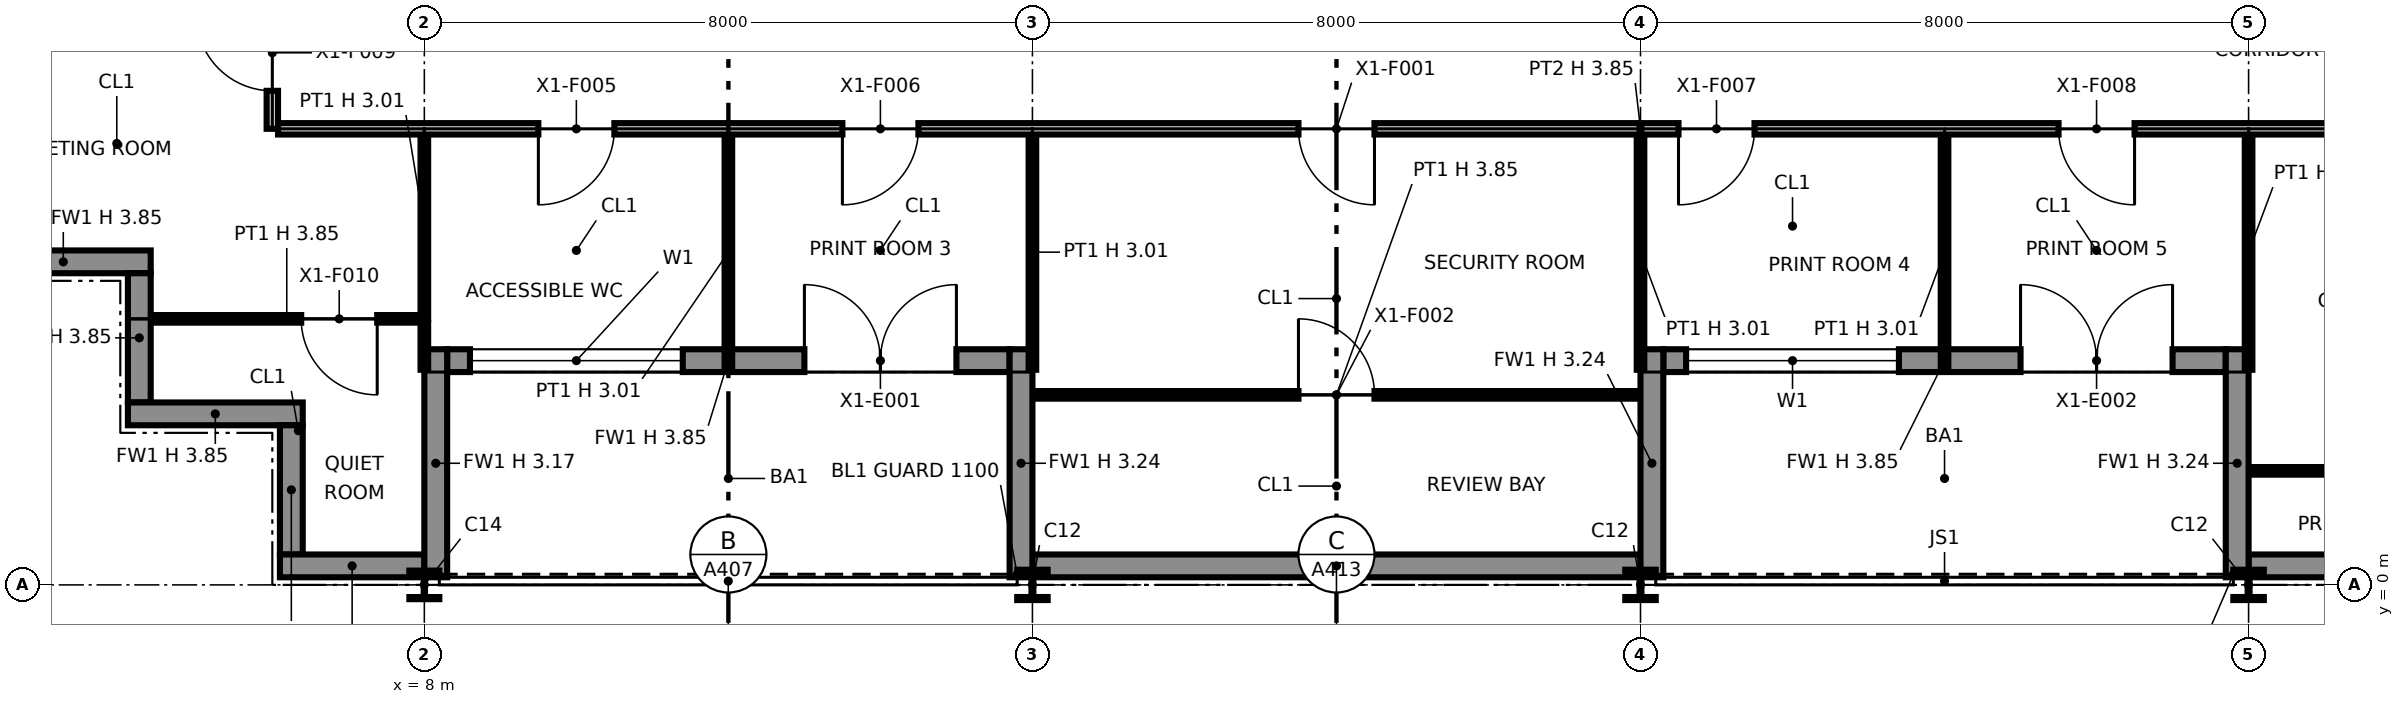
"""IFC4 building model, lengths in metres.
Left out: names, types, materials, properties, quantities, classifications, styles, units other than length and angle.
Written with IfcOpenShell. Run it as: python <this file> out.ifc"""

import sys

from ifc_helpers import new_model, si_unit, direction, frame, frame_2d, origin, origin_2d, place, context, subcontext, project, spatial, polyline, rectangle, i_section, outline, extrude, element, fill, save


model = new_model("IFC4")
c1 = context("Model", 3, precision=1e-05, world=origin(), true_north=direction((0.0, 1.0)))
c2 = subcontext(c1, "Body", "Model", "MODEL_VIEW")
j1 = project(units=[si_unit("LENGTHUNIT", "METRE"), si_unit("PLANEANGLEUNIT", "RADIAN")], contexts=[c1])
p1 = place(None, origin())
s1 = spatial("IfcSite", under=j1, at=p1, CompositionType="ELEMENT")
p2 = place(p1, origin())
s2 = spatial("IfcBuilding", under=s1, at=p2, CompositionType="ELEMENT")
p3 = place(p2, frame((0.0, 0.0, 247.0)))
s3 = spatial("IfcBuildingStorey", under=s2, at=p3, CompositionType="ELEMENT", Elevation=247.0)
p4 = place(p3, frame((8.0, 0.0, 0.0), z_axis=(0.0, 0.0, 1.0), x_axis=(1.0, 0.0, 0.0)))
e1 = element("IfcColumn", 1, at=p4, inside=s3, PredefinedType="COLUMN", context=c2, shape_type="SweptSolid", body=[
    extrude(i_section(OverallWidth=0.394, OverallDepth=0.376, WebThickness=0.017, FlangeThickness=0.028, at=origin_2d()), origin(), (0.0, 0.0, 1.0), 3.85),
])
for number, where, z_axis, x_axis in (
    (2, (16.0, 0.0, 0.0), (0.0, 0.0, 1.0), (1.0, 0.0, 0.0)),
    (3, (24.0, 0.0, 0.0), (0.0, 0.0, 1.0), (1.0, 0.0, 0.0)),
    (4, (32.0, 0.0, 0.0), (0.0, 0.0, 1.0), (1.0, 0.0, 0.0)),
):
    element("IfcColumn", number, at=place(p3, frame(where, z_axis=z_axis, x_axis=x_axis)), inside=s3, PredefinedType="COLUMN", context=c2, shape_type="SweptSolid", body=[
        extrude(i_section(OverallWidth=0.401, OverallDepth=0.399, WebThickness=0.025, FlangeThickness=0.04, at=origin_2d()), origin(), (0.0, 0.0, 1.0), 3.85),
    ])
p5 = place(p3, frame((2.1, 4.25, 0.0), z_axis=(0.0, 0.0, 1.0), x_axis=(1.0, 0.0, 0.0)))
e5 = element("IfcWall", 5, at=p5, inside=s3, PredefinedType="SOLIDWALL", context=c2, shape_type="SweptSolid", body=[
    extrude(rectangle(XDim=2.3, YDim=0.3, at=frame_2d((1.15, 0.0))), origin(), (0.0, 0.0, 1.0), 3.85),
])
p6 = place(p3, frame((4.25, 4.1, 0.0), z_axis=(0.0, 0.0, 1.0), x_axis=(0.0, -1.0, 0.0)))
e6 = element("IfcWall", 6, at=p6, inside=s3, PredefinedType="SOLIDWALL", context=c2, shape_type="SweptSolid", body=[
    extrude(rectangle(XDim=1.7, YDim=0.3, at=frame_2d((0.85, 0.0))), origin(), (0.0, 0.0, 1.0), 3.85),
])
p7 = place(p3, frame((4.1, 2.25, 0.0), z_axis=(0.0, 0.0, 1.0), x_axis=(1.0, 0.0, 0.0)))
e7 = element("IfcWall", 7, at=p7, inside=s3, PredefinedType="SOLIDWALL", context=c2, shape_type="SweptSolid", body=[
    extrude(rectangle(XDim=2.3, YDim=0.3, at=frame_2d((1.15, 0.0))), origin(), (0.0, 0.0, 1.0), 3.85),
])
p8 = place(p3, frame((6.25, 2.1, 0.0), z_axis=(0.0, 0.0, 1.0), x_axis=(0.0, -1.0, 0.0)))
e8 = element("IfcWall", 8, at=p8, inside=s3, PredefinedType="SOLIDWALL", context=c2, shape_type="SweptSolid", body=[
    extrude(rectangle(XDim=1.7, YDim=0.3, at=frame_2d((0.85, 0.0))), origin(), (0.0, 0.0, 1.0), 3.85),
])
p9 = place(p3, frame((6.1, 0.25, 0.0), z_axis=(0.0, 0.0, 1.0), x_axis=(1.0, 0.0, 0.0)))
e9 = element("IfcWall", 9, at=p9, inside=s3, PredefinedType="SOLIDWALL", context=c2, shape_type="SweptSolid", body=[
    extrude(rectangle(XDim=1.9, YDim=0.3, at=frame_2d((0.95, 0.0))), origin(), (0.0, 0.0, 1.0), 3.85),
])
p10 = place(p3, frame((8.3, 2.95, 0.0), z_axis=(0.0, 0.0, 1.0), x_axis=(1.0, 0.0, 0.0)))
e10 = element("IfcWall", 10, at=p10, inside=s3, PredefinedType="SOLIDWALL", context=c2, shape_type="SweptSolid", body=[
    extrude(rectangle(XDim=7.4, YDim=0.3, at=frame_2d((3.7, 0.0))), origin(), (0.0, 0.0, 1.0), 3.85),
])
p11 = place(p10, frame((0.3, 0.0, 0.9)))
e11 = element("IfcOpeningElement", 11, at=p11, cuts=e10, PredefinedType="OPENING", context=c2, shape_type="SweptSolid", body=[
    extrude(rectangle(XDim=2.8, YDim=2.2, at=frame_2d((1.4, 1.1))), frame((0.0, 0.16, 0.0), z_axis=(0.0, -1.0, 0.0), x_axis=(1.0, 0.0, 0.0)), (0.0, 0.0, 1.0), 0.32),
])
p12 = place(p10, frame((4.7, 0.0, 0.0)))
e12 = element("IfcOpeningElement", 12, at=p12, cuts=e10, PredefinedType="OPENING", context=c2, shape_type="SweptSolid", body=[
    extrude(rectangle(XDim=2.0, YDim=2.4, at=frame_2d((1.0, 1.2))), frame((0.0, 0.16, 0.0), z_axis=(0.0, -1.0, 0.0), x_axis=(1.0, 0.0, 0.0)), (0.0, 0.0, 1.0), 0.32),
])
p13 = place(p3, frame((8.15, 0.1, 0.0), z_axis=(0.0, 0.0, 1.0), x_axis=(0.0, 1.0, 0.0)))
e13 = element("IfcWall", 13, at=p13, inside=s3, PredefinedType="SOLIDWALL", context=c2, shape_type="SweptSolid", body=[
    extrude(rectangle(XDim=3.0, YDim=0.3, at=frame_2d((1.5, 0.0))), origin(), (0.0, 0.0, 1.0), 3.171),
])
p14 = place(p3, frame((15.85, 0.1, 0.0), z_axis=(0.0, 0.0, 1.0), x_axis=(0.0, 1.0, 0.0)))
e14 = element("IfcWall", 14, at=p14, inside=s3, PredefinedType="SOLIDWALL", context=c2, shape_type="SweptSolid", body=[
    extrude(rectangle(XDim=3.0, YDim=0.3, at=frame_2d((1.5, 0.0))), origin(), (0.0, 0.0, 1.0), 3.237),
])
p15 = place(p3, frame((16.0, 0.25, 0.0), z_axis=(0.0, 0.0, 1.0), x_axis=(1.0, 0.0, 0.0)))
e15 = element("IfcWall", 15, at=p15, inside=s3, PredefinedType="SOLIDWALL", context=c2, shape_type="SweptSolid", body=[
    extrude(rectangle(XDim=8.0, YDim=0.3, at=frame_2d((4.0, 0.0))), origin(), (0.0, 0.0, 1.0), 3.85),
])
p16 = place(p3, frame((24.3, 2.95, 0.0), z_axis=(0.0, 0.0, 1.0), x_axis=(1.0, 0.0, 0.0)))
e16 = element("IfcWall", 16, at=p16, inside=s3, PredefinedType="SOLIDWALL", context=c2, shape_type="SweptSolid", body=[
    extrude(rectangle(XDim=7.4, YDim=0.3, at=frame_2d((3.7, 0.0))), origin(), (0.0, 0.0, 1.0), 3.85),
])
p17 = place(p16, frame((0.3, 0.0, 0.9)))
e17 = element("IfcOpeningElement", 17, at=p17, cuts=e16, PredefinedType="OPENING", context=c2, shape_type="SweptSolid", body=[
    extrude(rectangle(XDim=2.8, YDim=2.2, at=frame_2d((1.4, 1.1))), frame((0.0, 0.16, 0.0), z_axis=(0.0, -1.0, 0.0), x_axis=(1.0, 0.0, 0.0)), (0.0, 0.0, 1.0), 0.32),
])
p18 = place(p16, frame((4.7, 0.0, 0.0)))
e18 = element("IfcOpeningElement", 18, at=p18, cuts=e16, PredefinedType="OPENING", context=c2, shape_type="SweptSolid", body=[
    extrude(rectangle(XDim=2.0, YDim=2.4, at=frame_2d((1.0, 1.2))), frame((0.0, 0.16, 0.0), z_axis=(0.0, -1.0, 0.0), x_axis=(1.0, 0.0, 0.0)), (0.0, 0.0, 1.0), 0.32),
])
for number, where, z_axis, x_axis in (
    (19, (24.15, 0.1, 0.0), (0.0, 0.0, 1.0), (0.0, 1.0, 0.0)),
    (20, (31.85, 0.1, 0.0), (0.0, 0.0, 1.0), (0.0, 1.0, 0.0)),
):
    element("IfcWall", number, at=place(p3, frame(where, z_axis=z_axis, x_axis=x_axis)), inside=s3, PredefinedType="SOLIDWALL", context=c2, shape_type="SweptSolid", body=[
        extrude(rectangle(XDim=3.0, YDim=0.3, at=frame_2d((1.5, 0.0))), origin(), (0.0, 0.0, 1.0), 3.237),
    ])
p19 = place(p3, frame((32.0, 0.25, 0.0), z_axis=(0.0, 0.0, 1.0), x_axis=(1.0, 0.0, 0.0)))
e21 = element("IfcWall", 21, at=p19, inside=s3, PredefinedType="SOLIDWALL", context=c2, shape_type="SweptSolid", body=[
    extrude(rectangle(XDim=9.9, YDim=0.3, at=frame_2d((4.95, 0.0))), origin(), (0.0, 0.0, 1.0), 3.85),
])
p20 = place(p3, frame((32.03, 1.5, 0.0), z_axis=(0.0, 0.0, 1.0), x_axis=(1.0, 0.0, 0.0)))
e22 = element("IfcWall", 22, at=p20, inside=s3, PredefinedType="PARTITIONING", context=c2, shape_type="SweptSolid", body=[
    extrude(rectangle(XDim=7.92, YDim=0.1, at=frame_2d((3.96, 0.0))), origin(), (0.0, 0.0, 1.0), 3.85),
])
p21 = place(p20, frame((3.47, 0.0, 0.0)))
e23 = element("IfcOpeningElement", 23, at=p21, cuts=e22, PredefinedType="OPENING", context=c2, shape_type="SweptSolid", body=[
    extrude(rectangle(XDim=1.0, YDim=2.1, at=frame_2d((0.5, 1.05))), frame((0.0, 0.06, 0.0), z_axis=(0.0, -1.0, 0.0), x_axis=(1.0, 0.0, 0.0)), (0.0, 0.0, 1.0), 0.12),
])
p22 = place(p3, frame((16.03, 2.5, 0.0), z_axis=(0.0, 0.0, 1.0), x_axis=(1.0, 0.0, 0.0)))
e24 = element("IfcWall", 24, at=p22, inside=s3, PredefinedType="PARTITIONING", context=c2, shape_type="SweptSolid", body=[
    extrude(rectangle(XDim=7.94, YDim=0.1, at=frame_2d((3.97, 0.0))), origin(), (0.0, 0.0, 1.0), 3.85),
])
p23 = place(p22, frame((3.47, 0.0, 0.0)))
e25 = element("IfcOpeningElement", 25, at=p23, cuts=e24, PredefinedType="OPENING", context=c2, shape_type="SweptSolid", body=[
    extrude(rectangle(XDim=1.0, YDim=2.1, at=frame_2d((0.5, 1.05))), frame((0.0, 0.06, 0.0), z_axis=(0.0, -1.0, 0.0), x_axis=(1.0, 0.0, 0.0)), (0.0, 0.0, 1.0), 0.12),
])
p24 = place(p3, frame((8.0, 2.83, 0.0), z_axis=(0.0, 0.0, 1.0), x_axis=(0.0, 1.0, 0.0)))
e26 = element("IfcWall", 26, at=p24, inside=s3, PredefinedType="PARTITIONING", context=c2, shape_type="SweptSolid", body=[
    extrude(rectangle(XDim=0.62, YDim=0.1, at=frame_2d((0.31, 0.0))), origin(), (0.0, 0.0, 1.0), 3.014),
])
for number, where, z_axis, x_axis in (
    (27, (12.0, 2.83, 0.0), (0.0, 0.0, 1.0), (0.0, 1.0, 0.0)),
    (28, (16.0, 2.83, 0.0), (0.0, 0.0, 1.0), (0.0, 1.0, 0.0)),
    (29, (24.0, 2.83, 0.0), (0.0, 0.0, 1.0), (0.0, 1.0, 0.0)),
    (30, (28.0, 2.83, 0.0), (0.0, 0.0, 1.0), (0.0, 1.0, 0.0)),
    (31, (32.0, 2.83, 0.0), (0.0, 0.0, 1.0), (0.0, 1.0, 0.0)),
):
    element("IfcWall", number, at=place(p3, frame(where, z_axis=z_axis, x_axis=x_axis)), inside=s3, PredefinedType="PARTITIONING", context=c2, shape_type="SweptSolid", body=[
        extrude(rectangle(XDim=3.095, YDim=0.1, at=frame_2d((1.547, 0.0))), origin(), (0.0, 0.0, 1.0), 3.014),
    ])
p25 = place(p3, frame((4.43, 3.5, 0.0), z_axis=(0.0, 0.0, 1.0), x_axis=(1.0, 0.0, 0.0)))
e32 = element("IfcWall", 32, at=p25, inside=s3, PredefinedType="PARTITIONING", context=c2, shape_type="SweptSolid", body=[
    extrude(rectangle(XDim=3.52, YDim=0.1, at=frame_2d((1.76, 0.0))), origin(), (0.0, 0.0, 1.0), 3.85),
])
p26 = place(p25, frame((2.95, 0.0, 0.0), z_axis=(0.0, 0.0, 1.0), x_axis=(-1.0, 0.0, 0.0)))
e33 = element("IfcOpeningElement", 33, at=p26, cuts=e32, PredefinedType="OPENING", context=c2, shape_type="SweptSolid", body=[
    extrude(rectangle(XDim=1.0, YDim=2.1, at=frame_2d((0.5, 1.05))), frame((0.0, 0.06, 0.0), z_axis=(0.0, -1.0, 0.0), x_axis=(1.0, 0.0, 0.0)), (0.0, 0.0, 1.0), 0.12),
])
p27 = place(p3, frame((8.0, 3.5, 0.0), z_axis=(0.0, 0.0, 1.0), x_axis=(0.0, 1.0, 0.0)))
e34 = element("IfcWall", 34, at=p27, inside=s3, PredefinedType="PARTITIONING", context=c2, shape_type="SweptSolid", body=[
    extrude(rectangle(XDim=2.425, YDim=0.1, at=frame_2d((1.212, 0.0))), origin(), (0.0, 0.0, 1.0), 3.014),
])
p28 = place(p3, frame((6.075, 6.0, 0.0), z_axis=(0.0, 0.0, 1.0), x_axis=(1.0, 0.0, 0.0)))
e35 = element("IfcWall", 35, at=p28, inside=s3, PredefinedType="PARTITIONING", context=c2, shape_type="SweptSolid", body=[
    extrude(rectangle(XDim=35.85, YDim=0.15, at=frame_2d((17.925, 0.0))), origin(), (0.0, 0.0, 1.0), 3.85),
])
p29 = place(p28, frame((14.425, 0.0, 0.0), z_axis=(0.0, 0.0, 1.0), x_axis=(-1.0, 0.0, 0.0)))
e36 = element("IfcOpeningElement", 36, at=p29, cuts=e35, PredefinedType="OPENING", context=c2, shape_type="SweptSolid", body=[
    extrude(rectangle(XDim=1.0, YDim=2.1, at=frame_2d((0.5, 1.05))), frame((0.0, 0.085, 0.0), z_axis=(0.0, -1.0, 0.0), x_axis=(1.0, 0.0, 0.0)), (0.0, 0.0, 1.0), 0.17),
])
p30 = place(p28, frame((30.425, 0.0, 0.0), z_axis=(0.0, 0.0, 1.0), x_axis=(-1.0, 0.0, 0.0)))
e37 = element("IfcOpeningElement", 37, at=p30, cuts=e35, PredefinedType="OPENING", context=c2, shape_type="SweptSolid", body=[
    extrude(rectangle(XDim=1.0, YDim=2.1, at=frame_2d((0.5, 1.05))), frame((0.0, 0.085, 0.0), z_axis=(0.0, -1.0, 0.0), x_axis=(1.0, 0.0, 0.0)), (0.0, 0.0, 1.0), 0.17),
])
p31 = place(p28, frame((4.425, 0.0, 0.0), z_axis=(0.0, 0.0, 1.0), x_axis=(-1.0, 0.0, 0.0)))
e38 = element("IfcOpeningElement", 38, at=p31, cuts=e35, PredefinedType="OPENING", context=c2, shape_type="SweptSolid", body=[
    extrude(rectangle(XDim=1.0, YDim=2.1, at=frame_2d((0.5, 1.05))), frame((0.0, 0.085, 0.0), z_axis=(0.0, -1.0, 0.0), x_axis=(1.0, 0.0, 0.0)), (0.0, 0.0, 1.0), 0.17),
])
p32 = place(p28, frame((8.425, 0.0, 0.0), z_axis=(0.0, 0.0, 1.0), x_axis=(-1.0, 0.0, 0.0)))
e39 = element("IfcOpeningElement", 39, at=p32, cuts=e35, PredefinedType="OPENING", context=c2, shape_type="SweptSolid", body=[
    extrude(rectangle(XDim=1.0, YDim=2.1, at=frame_2d((0.5, 1.05))), frame((0.0, 0.085, 0.0), z_axis=(0.0, -1.0, 0.0), x_axis=(1.0, 0.0, 0.0)), (0.0, 0.0, 1.0), 0.17),
])
p33 = place(p28, frame((19.425, 0.0, 0.0), z_axis=(0.0, 0.0, 1.0), x_axis=(-1.0, 0.0, 0.0)))
e40 = element("IfcOpeningElement", 40, at=p33, cuts=e35, PredefinedType="OPENING", context=c2, shape_type="SweptSolid", body=[
    extrude(rectangle(XDim=1.0, YDim=2.1, at=frame_2d((0.5, 1.05))), frame((0.0, 0.085, 0.0), z_axis=(0.0, -1.0, 0.0), x_axis=(1.0, 0.0, 0.0)), (0.0, 0.0, 1.0), 0.17),
])
p34 = place(p28, frame((24.425, 0.0, 0.0), z_axis=(0.0, 0.0, 1.0), x_axis=(-1.0, 0.0, 0.0)))
e41 = element("IfcOpeningElement", 41, at=p34, cuts=e35, PredefinedType="OPENING", context=c2, shape_type="SweptSolid", body=[
    extrude(rectangle(XDim=1.0, YDim=2.1, at=frame_2d((0.5, 1.05))), frame((0.0, 0.085, 0.0), z_axis=(0.0, -1.0, 0.0), x_axis=(1.0, 0.0, 0.0)), (0.0, 0.0, 1.0), 0.17),
])
p35 = place(p28, frame((35.425, 0.0, 0.0), z_axis=(0.0, 0.0, 1.0), x_axis=(-1.0, 0.0, 0.0)))
e42 = element("IfcOpeningElement", 42, at=p35, cuts=e35, PredefinedType="OPENING", context=c2, shape_type="SweptSolid", body=[
    extrude(rectangle(XDim=1.0, YDim=2.1, at=frame_2d((0.5, 1.05))), frame((0.0, 0.085, 0.0), z_axis=(0.0, -1.0, 0.0), x_axis=(1.0, 0.0, 0.0)), (0.0, 0.0, 1.0), 0.17),
])
p36 = place(p3, frame((6.0, 6.0, 0.0), z_axis=(0.0, 0.0, 1.0), x_axis=(0.0, 1.0, 0.0)))
e43 = element("IfcWall", 43, at=p36, inside=s3, PredefinedType="PARTITIONING", context=c2, shape_type="SweptSolid", body=[
    extrude(outline(polyline([(0.0, 0.0), (13.375, 0.0), (13.375, 3.85), (10.3, 3.85), (10.298, 3.014), (9.702, 3.014), (9.7, 3.85), (6.3, 3.85), (6.298, 3.014), (5.702, 3.014), (5.7, 3.85), (2.3, 3.85), (2.298, 3.014), (1.702, 3.014), (1.7, 3.85), (0.0, 3.85), (0.0, 0.0)])), frame((0.0, 0.075, 0.0), z_axis=(0.0, -1.0, 0.0), x_axis=(1.0, 0.0, 0.0)), (0.0, 0.0, 1.0), 0.15),
])
p37 = place(p36, frame((0.5, 0.0, 0.0)))
e44 = element("IfcOpeningElement", 44, at=p37, cuts=e43, PredefinedType="OPENING", context=c2, shape_type="SweptSolid", body=[
    extrude(rectangle(XDim=1.0, YDim=2.1, at=frame_2d((0.5, 1.05))), frame((0.0, 0.085, 0.0), z_axis=(0.0, -1.0, 0.0), x_axis=(1.0, 0.0, 0.0)), (0.0, 0.0, 1.0), 0.17),
])
p38 = place(p36, frame((3.5, 0.0, 0.0)))
e45 = element("IfcOpeningElement", 45, at=p38, cuts=e43, PredefinedType="OPENING", context=c2, shape_type="SweptSolid", body=[
    extrude(rectangle(XDim=1.0, YDim=2.1, at=frame_2d((0.5, 1.05))), frame((0.0, 0.085, 0.0), z_axis=(0.0, -1.0, 0.0), x_axis=(1.0, 0.0, 0.0)), (0.0, 0.0, 1.0), 0.17),
])
p39 = place(p36, frame((7.5, 0.0, 0.0)))
e46 = element("IfcOpeningElement", 46, at=p39, cuts=e43, PredefinedType="OPENING", context=c2, shape_type="SweptSolid", body=[
    extrude(rectangle(XDim=1.0, YDim=2.1, at=frame_2d((0.5, 1.05))), frame((0.0, 0.085, 0.0), z_axis=(0.0, -1.0, 0.0), x_axis=(1.0, 0.0, 0.0)), (0.0, 0.0, 1.0), 0.17),
])
p40 = place(p36, frame((11.225, 0.0, 0.0)))
e47 = element("IfcOpeningElement", 47, at=p40, cuts=e43, PredefinedType="OPENING", context=c2, shape_type="SweptSolid", body=[
    extrude(rectangle(XDim=1.0, YDim=2.1, at=frame_2d((0.5, 1.05))), frame((0.0, 0.085, 0.0), z_axis=(0.0, -1.0, 0.0), x_axis=(1.0, 0.0, 0.0)), (0.0, 0.0, 1.0), 0.17),
])
p41 = place(p11, origin())
e48 = element("IfcWindow", 48, at=p41, inside=s3, PartitioningType="SINGLE_PANEL", PredefinedType="WINDOW", context=c2, shape_type="SweptSolid", body=[
    extrude(rectangle(XDim=2.8, YDim=2.2, at=frame_2d((1.4, 1.1))), frame((0.0, 0.03, 0.0), z_axis=(0.0, -1.0, 0.0), x_axis=(1.0, 0.0, 0.0)), (0.0, 0.0, 1.0), 0.06),
])
fill(e11, e48)
p42 = place(p12, origin())
e49 = element("IfcDoor", 49, at=p42, inside=s3, OperationType="DOUBLE_DOOR_SINGLE_SWING", PredefinedType="DOOR", context=c2, shape_type="SweptSolid", body=[
    extrude(rectangle(XDim=2.0, YDim=2.4, at=frame_2d((1.0, 1.2))), frame((0.0, 0.025, 0.0), z_axis=(0.0, -1.0, 0.0), x_axis=(1.0, 0.0, 0.0)), (0.0, 0.0, 1.0), 0.05),
])
fill(e12, e49)
p43 = place(p17, origin())
e50 = element("IfcWindow", 50, at=p43, inside=s3, PartitioningType="SINGLE_PANEL", PredefinedType="WINDOW", context=c2, shape_type="SweptSolid", body=[
    extrude(rectangle(XDim=2.8, YDim=2.2, at=frame_2d((1.4, 1.1))), frame((0.0, 0.03, 0.0), z_axis=(0.0, -1.0, 0.0), x_axis=(1.0, 0.0, 0.0)), (0.0, 0.0, 1.0), 0.06),
])
fill(e17, e50)
p44 = place(p18, origin())
e51 = element("IfcDoor", 51, at=p44, inside=s3, OperationType="DOUBLE_DOOR_SINGLE_SWING", PredefinedType="DOOR", context=c2, shape_type="SweptSolid", body=[
    extrude(rectangle(XDim=2.0, YDim=2.4, at=frame_2d((1.0, 1.2))), frame((0.0, 0.025, 0.0), z_axis=(0.0, -1.0, 0.0), x_axis=(1.0, 0.0, 0.0)), (0.0, 0.0, 1.0), 0.05),
])
fill(e18, e51)
p45 = place(p29, origin())
e52 = element("IfcDoor", 52, at=p45, inside=s3, OperationType="SINGLE_SWING_LEFT", PredefinedType="DOOR", context=c2, shape_type="SweptSolid", body=[
    extrude(rectangle(XDim=1.0, YDim=2.1, at=frame_2d((0.5, 1.05))), frame((0.0, 0.025, 0.0), z_axis=(0.0, -1.0, 0.0), x_axis=(1.0, 0.0, 0.0)), (0.0, 0.0, 1.0), 0.05),
])
fill(e36, e52)
p46 = place(p23, origin())
e53 = element("IfcDoor", 53, at=p46, inside=s3, OperationType="SINGLE_SWING_LEFT", PredefinedType="DOOR", context=c2, shape_type="SweptSolid", body=[
    extrude(rectangle(XDim=1.0, YDim=2.1, at=frame_2d((0.5, 1.05))), frame((0.0, 0.025, 0.0), z_axis=(0.0, -1.0, 0.0), x_axis=(1.0, 0.0, 0.0)), (0.0, 0.0, 1.0), 0.05),
])
fill(e25, e53)
p47 = place(p31, origin())
e54 = element("IfcDoor", 54, at=p47, inside=s3, OperationType="SINGLE_SWING_RIGHT", PredefinedType="DOOR", context=c2, shape_type="SweptSolid", body=[
    extrude(rectangle(XDim=1.0, YDim=2.1, at=frame_2d((0.5, 1.05))), frame((0.0, 0.025, 0.0), z_axis=(0.0, -1.0, 0.0), x_axis=(1.0, 0.0, 0.0)), (0.0, 0.0, 1.0), 0.05),
])
fill(e38, e54)
p48 = place(p32, origin())
e55 = element("IfcDoor", 55, at=p48, inside=s3, OperationType="SINGLE_SWING_RIGHT", PredefinedType="DOOR", context=c2, shape_type="SweptSolid", body=[
    extrude(rectangle(XDim=1.0, YDim=2.1, at=frame_2d((0.5, 1.05))), frame((0.0, 0.025, 0.0), z_axis=(0.0, -1.0, 0.0), x_axis=(1.0, 0.0, 0.0)), (0.0, 0.0, 1.0), 0.05),
])
fill(e39, e55)
p49 = place(p33, origin())
e56 = element("IfcDoor", 56, at=p49, inside=s3, OperationType="SINGLE_SWING_RIGHT", PredefinedType="DOOR", context=c2, shape_type="SweptSolid", body=[
    extrude(rectangle(XDim=1.0, YDim=2.1, at=frame_2d((0.5, 1.05))), frame((0.0, 0.025, 0.0), z_axis=(0.0, -1.0, 0.0), x_axis=(1.0, 0.0, 0.0)), (0.0, 0.0, 1.0), 0.05),
])
fill(e40, e56)
p50 = place(p34, origin())
e57 = element("IfcDoor", 57, at=p50, inside=s3, OperationType="SINGLE_SWING_LEFT", PredefinedType="DOOR", context=c2, shape_type="SweptSolid", body=[
    extrude(rectangle(XDim=1.0, YDim=2.1, at=frame_2d((0.5, 1.05))), frame((0.0, 0.025, 0.0), z_axis=(0.0, -1.0, 0.0), x_axis=(1.0, 0.0, 0.0)), (0.0, 0.0, 1.0), 0.05),
])
fill(e41, e57)
p51 = place(p37, origin())
e58 = element("IfcDoor", 58, at=p51, inside=s3, OperationType="SINGLE_SWING_RIGHT", PredefinedType="DOOR", context=c2, shape_type="SweptSolid", body=[
    extrude(rectangle(XDim=1.0, YDim=2.1, at=frame_2d((0.5, 1.05))), frame((0.0, 0.025, 0.0), z_axis=(0.0, -1.0, 0.0), x_axis=(1.0, 0.0, 0.0)), (0.0, 0.0, 1.0), 0.05),
])
fill(e44, e58)
p52 = place(p26, origin())
e59 = element("IfcDoor", 59, at=p52, inside=s3, OperationType="SINGLE_SWING_LEFT", PredefinedType="DOOR", context=c2, shape_type="SweptSolid", body=[
    extrude(rectangle(XDim=1.0, YDim=2.1, at=frame_2d((0.5, 1.05))), frame((0.0, 0.025, 0.0), z_axis=(0.0, -1.0, 0.0), x_axis=(1.0, 0.0, 0.0)), (0.0, 0.0, 1.0), 0.05),
])
fill(e33, e59)
save(model, sys.argv[1])
